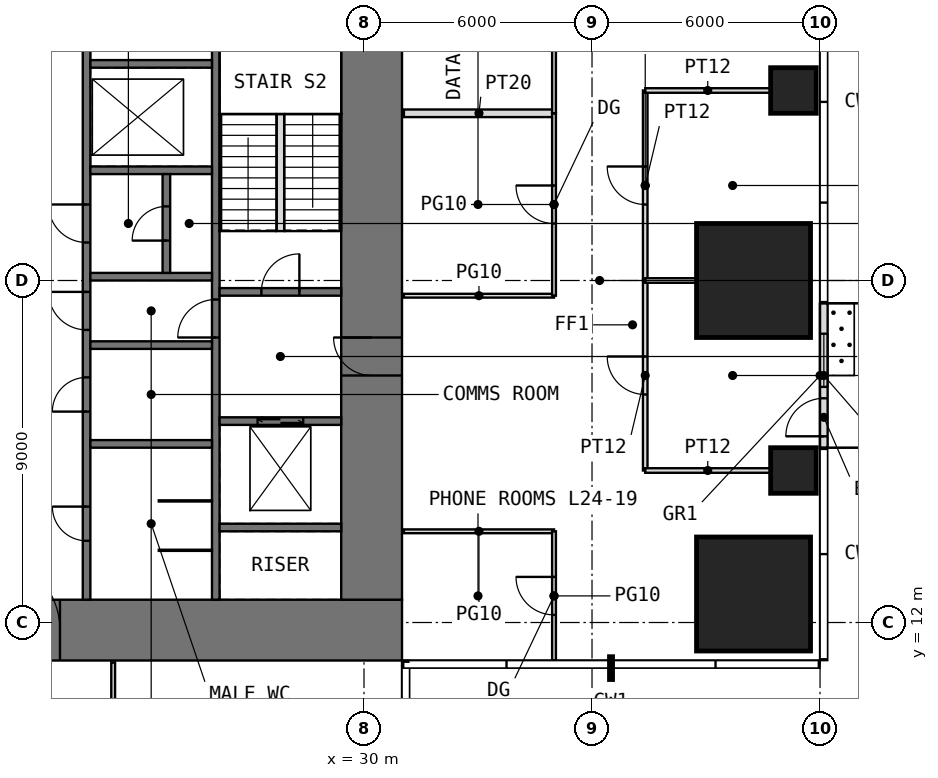
"""IFC4 building model, lengths in metres.
Left out: names, types, materials, properties, quantities, classifications, styles, units other than length and angle.
Written with IfcOpenShell. Run it as: python <this file> out.ifc"""

import sys

from ifc_helpers import new_model, si_unit, direction, frame, frame_2d, origin, origin_2d, place, context, subcontext, project, spatial, rectangle, extrude, element, fill, save


model = new_model("IFC4")
c1 = context("Model", 3, precision=1e-05, world=origin(), true_north=direction((0.0, 1.0)))
c2 = subcontext(c1, "Body", "Model", "MODEL_VIEW")
j1 = project(units=[si_unit("LENGTHUNIT", "METRE"), si_unit("PLANEANGLEUNIT", "RADIAN")], contexts=[c1])
p1 = place(None, origin())
s1 = spatial("IfcSite", under=j1, at=p1, CompositionType="ELEMENT")
p2 = place(p1, origin())
s2 = spatial("IfcBuilding", under=s1, at=p2, CompositionType="ELEMENT")
p3 = place(p2, frame((0.0, 0.0, 104.5)))
s3 = spatial("IfcBuildingStorey", under=s2, at=p3, CompositionType="ELEMENT", Elevation=104.5)
p4 = place(p3, frame((40.25, 12.75, 0.0), z_axis=(0.0, 0.0, 1.0), x_axis=(1.0, 0.0, 0.0)))
e1 = element("IfcColumn", 1, at=p4, inside=s3, PredefinedType="COLUMN", context=c2, shape_type="SweptSolid", body=[
    extrude(rectangle(XDim=3.0, YDim=3.0, at=origin_2d()), origin(), (0.0, 0.0, 1.0), 4.0),
])
p5 = place(p3, frame((41.3, 16.0, 0.0), z_axis=(0.0, 0.0, 1.0), x_axis=(1.0, 0.0, 0.0)))
e2 = element("IfcColumn", 2, at=p5, inside=s3, PredefinedType="COLUMN", context=c2, shape_type="SweptSolid", body=[
    extrude(rectangle(XDim=1.2, YDim=1.2, at=origin_2d()), origin(), (0.0, 0.0, 1.0), 4.0),
])
p6 = place(p3, frame((40.25, 21.0, 0.0), z_axis=(0.0, 0.0, 1.0), x_axis=(1.0, 0.0, 0.0)))
e3 = element("IfcColumn", 3, at=p6, inside=s3, PredefinedType="COLUMN", context=c2, shape_type="SweptSolid", body=[
    extrude(rectangle(XDim=3.0, YDim=3.0, at=origin_2d()), origin(), (0.0, 0.0, 1.0), 4.0),
])
p7 = place(p3, frame((41.3, 26.0, 0.0), z_axis=(0.0, 0.0, 1.0), x_axis=(1.0, 0.0, 0.0)))
e4 = element("IfcColumn", 4, at=p7, inside=s3, PredefinedType="COLUMN", context=c2, shape_type="SweptSolid", body=[
    extrude(rectangle(XDim=1.2, YDim=1.2, at=origin_2d()), origin(), (0.0, 0.0, 1.0), 4.0),
])
p8 = place(p3, frame((42.1, 16.6, 0.0), z_axis=(0.0, 0.0, 1.0), x_axis=(0.0, 1.0, 0.0)))
e5 = element("IfcWall", 5, at=p8, inside=s3, PredefinedType="USERDEFINED", context=c2, shape_type="SweptSolid", body=[
    extrude(rectangle(XDim=3.8, YDim=0.2, at=frame_2d((1.9, 0.0))), origin(), (0.0, 0.0, 1.0), 3.75),
])
p9 = place(p8, frame((0.3, 0.0, 0.0)))
e6 = element("IfcOpeningElement", 6, at=p9, cuts=e5, PredefinedType="OPENING", context=c2, shape_type="SweptSolid", body=[
    extrude(rectangle(XDim=1.0, YDim=2.4, at=frame_2d((0.5, 1.2))), frame((0.0, 0.11, 0.0), z_axis=(0.0, -1.0, 0.0), x_axis=(1.0, 0.0, 0.0)), (0.0, 0.0, 1.0), 0.22),
])
p10 = place(p8, frame((1.6, 0.0, 0.3)))
e7 = element("IfcOpeningElement", 7, at=p10, cuts=e5, PredefinedType="OPENING", context=c2, shape_type="SweptSolid", body=[
    extrude(rectangle(XDim=1.4, YDim=2.7, at=frame_2d((0.7, 1.35))), frame((0.0, 0.11, 0.0), z_axis=(0.0, -1.0, 0.0), x_axis=(1.0, 0.0, 0.0)), (0.0, 0.0, 1.0), 0.22),
])
p11 = place(p3, frame((11.0, 11.8, -0.05), z_axis=(0.0, 0.0, 1.0), x_axis=(1.0, 0.0, 0.0)))
e8 = element("IfcWall", 8, at=p11, inside=s3, PredefinedType="SHEAR", context=c2, shape_type="SweptSolid", body=[
    extrude(rectangle(XDim=20.0, YDim=1.6, at=frame_2d((10.0, 0.0))), origin(), (0.0, 0.0, 1.0), 4.0),
])
p12 = place(p11, frame((9.0, 0.0, 0.05)))
e9 = element("IfcOpeningElement", 9, at=p12, cuts=e8, PredefinedType="OPENING", context=c2, shape_type="SweptSolid", body=[
    extrude(rectangle(XDim=2.0, YDim=2.2, at=frame_2d((1.0, 1.1))), frame((0.0, 0.81, 0.0), z_axis=(0.0, -1.0, 0.0), x_axis=(1.0, 0.0, 0.0)), (0.0, 0.0, 1.0), 1.62),
])
p13 = place(p3, frame((30.2, 12.6, -0.05), z_axis=(0.0, 0.0, 1.0), x_axis=(0.0, 1.0, 0.0)))
e10 = element("IfcWall", 10, at=p13, inside=s3, PredefinedType="SHEAR", context=c2, shape_type="SweptSolid", body=[
    extrude(rectangle(XDim=16.8, YDim=1.6, at=frame_2d((8.4, 0.0))), origin(), (0.0, 0.0, 1.0), 4.0),
])
p14 = place(p13, frame((5.9, 0.0, 0.05)))
e11 = element("IfcOpeningElement", 11, at=p14, cuts=e10, PredefinedType="OPENING", context=c2, shape_type="SweptSolid", body=[
    extrude(rectangle(XDim=1.0, YDim=2.2, at=frame_2d((0.5, 1.1))), frame((0.0, 0.81, 0.0), z_axis=(0.0, -1.0, 0.0), x_axis=(1.0, 0.0, 0.0)), (0.0, 0.0, 1.0), 1.62),
])
p15 = place(p3, frame((22.7, 12.6, -0.05), z_axis=(0.0, 0.0, 1.0), x_axis=(0.0, 1.0, 0.0)))
e12 = element("IfcWall", 12, at=p15, inside=s3, PredefinedType="SHEAR", context=c2, shape_type="SweptSolid", body=[
    extrude(rectangle(XDim=16.8, YDim=0.2, at=frame_2d((8.4, 0.0))), origin(), (0.0, 0.0, 1.0), 4.0),
])
p16 = place(p15, frame((7.1, 0.0, 0.05)))
e13 = element("IfcOpeningElement", 13, at=p16, cuts=e12, PredefinedType="OPENING", context=c2, shape_type="SweptSolid", body=[
    extrude(rectangle(XDim=1.0, YDim=2.2, at=frame_2d((0.5, 1.1))), frame((0.0, 0.11, 0.0), z_axis=(0.0, -1.0, 0.0), x_axis=(1.0, 0.0, 0.0)), (0.0, 0.0, 1.0), 0.22),
])
p17 = place(p15, frame((1.55, 0.0, 0.05)))
e14 = element("IfcOpeningElement", 14, at=p17, cuts=e12, PredefinedType="OPENING", context=c2, shape_type="SweptSolid", body=[
    extrude(rectangle(XDim=0.9, YDim=2.2, at=frame_2d((0.45, 1.1))), frame((0.0, 0.11, 0.0), z_axis=(0.0, -1.0, 0.0), x_axis=(1.0, 0.0, 0.0)), (0.0, 0.0, 1.0), 0.22),
])
p18 = place(p15, frame((4.95, 0.0, 0.05)))
e15 = element("IfcOpeningElement", 15, at=p18, cuts=e12, PredefinedType="OPENING", context=c2, shape_type="SweptSolid", body=[
    extrude(rectangle(XDim=0.9, YDim=2.2, at=frame_2d((0.45, 1.1))), frame((0.0, 0.11, 0.0), z_axis=(0.0, -1.0, 0.0), x_axis=(1.0, 0.0, 0.0)), (0.0, 0.0, 1.0), 0.22),
])
p19 = place(p15, frame((9.4, 0.0, 0.05)))
e16 = element("IfcOpeningElement", 16, at=p19, cuts=e12, PredefinedType="OPENING", context=c2, shape_type="SweptSolid", body=[
    extrude(rectangle(XDim=1.0, YDim=2.2, at=frame_2d((0.5, 1.1))), frame((0.0, 0.11, 0.0), z_axis=(0.0, -1.0, 0.0), x_axis=(1.0, 0.0, 0.0)), (0.0, 0.0, 1.0), 0.22),
])
p20 = place(p3, frame((26.1, 12.6, -0.05), z_axis=(0.0, 0.0, 1.0), x_axis=(0.0, 1.0, 0.0)))
e17 = element("IfcWall", 17, at=p20, inside=s3, PredefinedType="SHEAR", context=c2, shape_type="SweptSolid", body=[
    extrude(rectangle(XDim=16.8, YDim=0.2, at=frame_2d((8.4, 0.0))), origin(), (0.0, 0.0, 1.0), 4.0),
])
p21 = place(p20, frame((6.9, 0.0, 0.05)))
e18 = element("IfcOpeningElement", 18, at=p21, cuts=e17, PredefinedType="OPENING", context=c2, shape_type="SweptSolid", body=[
    extrude(rectangle(XDim=1.0, YDim=2.2, at=frame_2d((0.5, 1.1))), frame((0.0, 0.11, 0.0), z_axis=(0.0, -1.0, 0.0), x_axis=(1.0, 0.0, 0.0)), (0.0, 0.0, 1.0), 0.22),
])
for number, where, z_axis, x_axis in (
    (19, (22.8, 16.7, -0.05), (0.0, 0.0, 1.0), (1.0, 0.0, 0.0)),
    (20, (22.8, 19.3, -0.05), (0.0, 0.0, 1.0), (1.0, 0.0, 0.0)),
    (21, (22.8, 21.1, -0.05), (0.0, 0.0, 1.0), (1.0, 0.0, 0.0)),
    (22, (22.8, 23.9, -0.05), (0.0, 0.0, 1.0), (1.0, 0.0, 0.0)),
    (23, (22.8, 26.7, -0.05), (0.0, 0.0, 1.0), (1.0, 0.0, 0.0)),
    (24, (26.2, 14.5, -0.05), (0.0, 0.0, 1.0), (1.0, 0.0, 0.0)),
):
    element("IfcWall", number, at=place(p3, frame(where, z_axis=z_axis, x_axis=x_axis)), inside=s3, PredefinedType="SHEAR", context=c2, shape_type="SweptSolid", body=[
        extrude(rectangle(XDim=3.2, YDim=0.2, at=frame_2d((1.6, 0.0))), origin(), (0.0, 0.0, 1.0), 4.0),
    ])
p22 = place(p3, frame((26.2, 17.3, -0.05), z_axis=(0.0, 0.0, 1.0), x_axis=(1.0, 0.0, 0.0)))
e25 = element("IfcWall", 25, at=p22, inside=s3, PredefinedType="SHEAR", context=c2, shape_type="SweptSolid", body=[
    extrude(rectangle(XDim=3.2, YDim=0.2, at=frame_2d((1.6, 0.0))), origin(), (0.0, 0.0, 1.0), 4.0),
])
p23 = place(p22, frame((1.0, 0.0, 0.05)))
e26 = element("IfcOpeningElement", 26, at=p23, cuts=e25, PredefinedType="OPENING", context=c2, shape_type="SweptSolid", body=[
    extrude(rectangle(XDim=1.2, YDim=2.2, at=frame_2d((0.6, 1.1))), frame((0.0, 0.11, 0.0), z_axis=(0.0, -1.0, 0.0), x_axis=(1.0, 0.0, 0.0)), (0.0, 0.0, 1.0), 0.22),
])
p24 = place(p3, frame((26.2, 20.7, -0.05), z_axis=(0.0, 0.0, 1.0), x_axis=(1.0, 0.0, 0.0)))
e27 = element("IfcWall", 27, at=p24, inside=s3, PredefinedType="SHEAR", context=c2, shape_type="SweptSolid", body=[
    extrude(rectangle(XDim=3.2, YDim=0.2, at=frame_2d((1.6, 0.0))), origin(), (0.0, 0.0, 1.0), 4.0),
])
p25 = place(p24, frame((1.1, 0.0, 0.05)))
e28 = element("IfcOpeningElement", 28, at=p25, cuts=e27, PredefinedType="OPENING", context=c2, shape_type="SweptSolid", body=[
    extrude(rectangle(XDim=1.0, YDim=2.2, at=frame_2d((0.5, 1.1))), frame((0.0, 0.11, 0.0), z_axis=(0.0, -1.0, 0.0), x_axis=(1.0, 0.0, 0.0)), (0.0, 0.0, 1.0), 0.22),
])
for number, where, z_axis, x_axis in (
    (29, (24.6, 13.9, 0.0), (0.0, 0.0, 1.0), (1.0, 0.0, 0.0)),
    (30, (24.6, 15.2, 0.0), (0.0, 0.0, 1.0), (1.0, 0.0, 0.0)),
):
    element("IfcWall", number, at=place(p3, frame(where, z_axis=z_axis, x_axis=x_axis)), inside=s3, PredefinedType="PARTITIONING", context=c2, shape_type="SweptSolid", body=[
        extrude(rectangle(XDim=1.4, YDim=0.03, at=frame_2d((0.7, 0.0))), origin(), (0.0, 0.0, 1.0), 3.75),
    ])
p26 = place(p3, frame((24.8, 21.2, -0.05), z_axis=(0.0, 0.0, 1.0), x_axis=(0.0, 1.0, 0.0)))
e31 = element("IfcWall", 31, at=p26, inside=s3, PredefinedType="SHEAR", context=c2, shape_type="SweptSolid", body=[
    extrude(rectangle(XDim=2.6, YDim=0.2, at=frame_2d((1.3, 0.0))), origin(), (0.0, 0.0, 1.0), 4.0),
])
p27 = place(p26, frame((0.85, 0.0, 0.05)))
e32 = element("IfcOpeningElement", 32, at=p27, cuts=e31, PredefinedType="OPENING", context=c2, shape_type="SweptSolid", body=[
    extrude(rectangle(XDim=0.9, YDim=2.2, at=frame_2d((0.45, 1.1))), frame((0.0, 0.11, 0.0), z_axis=(0.0, -1.0, 0.0), x_axis=(1.0, 0.0, 0.0)), (0.0, 0.0, 1.0), 0.22),
])
for number, where, z_axis, x_axis in (
    (33, (23.4, 7.0, 0.0), (0.0, 0.0, 1.0), (0.0, 1.0, 0.0)),
    (34, (31.05, 14.4, 0.0), (0.0, 0.0, 1.0), (1.0, 0.0, 0.0)),
    (35, (31.05, 20.6, 0.0), (0.0, 0.0, 1.0), (1.0, 0.0, 0.0)),
):
    element("IfcWall", number, at=place(p3, frame(where, z_axis=z_axis, x_axis=x_axis)), inside=s3, PredefinedType="PARTITIONING", context=c2, shape_type="SweptSolid", body=[
        extrude(rectangle(XDim=3.95, YDim=0.1, at=frame_2d((1.975, 0.0))), origin(), (0.0, 0.0, 1.0), 3.75),
    ])
p28 = place(p3, frame((31.05, 25.4, 0.0), z_axis=(0.0, 0.0, 1.0), x_axis=(1.0, 0.0, 0.0)))
e36 = element("IfcWall", 36, at=p28, inside=s3, PredefinedType="PARTITIONING", context=c2, shape_type="SweptSolid", body=[
    extrude(rectangle(XDim=3.95, YDim=0.2, at=frame_2d((1.975, 0.0))), origin(), (0.0, 0.0, 1.0), 3.75),
])
p29 = place(p3, frame((35.0, 11.0, 0.0), z_axis=(0.0, 0.0, 1.0), x_axis=(0.0, 1.0, 0.0)))
e37 = element("IfcWall", 37, at=p29, inside=s3, PredefinedType="PARTITIONING", context=c2, shape_type="SweptSolid", body=[
    extrude(rectangle(XDim=3.4, YDim=0.1, at=frame_2d((1.7, 0.0))), origin(), (0.0, 0.0, 1.0), 3.75),
])
p30 = place(p29, frame((1.2, 0.0, 0.0)))
e38 = element("IfcOpeningElement", 38, at=p30, cuts=e37, PredefinedType="OPENING", context=c2, shape_type="SweptSolid", body=[
    extrude(rectangle(XDim=1.0, YDim=2.4, at=frame_2d((0.5, 1.2))), frame((0.0, 0.06, 0.0), z_axis=(0.0, -1.0, 0.0), x_axis=(1.0, 0.0, 0.0)), (0.0, 0.0, 1.0), 0.12),
])
p31 = place(p3, frame((35.0, 20.6, 0.0), z_axis=(0.0, 0.0, 1.0), x_axis=(0.0, 1.0, 0.0)))
e39 = element("IfcWall", 39, at=p31, inside=s3, PredefinedType="PARTITIONING", context=c2, shape_type="SweptSolid", body=[
    extrude(rectangle(XDim=4.8, YDim=0.1, at=frame_2d((2.4, 0.0))), origin(), (0.0, 0.0, 1.0), 3.75),
])
p32 = place(p31, frame((1.9, 0.0, 0.0)))
e40 = element("IfcOpeningElement", 40, at=p32, cuts=e39, PredefinedType="OPENING", context=c2, shape_type="SweptSolid", body=[
    extrude(rectangle(XDim=1.0, YDim=2.4, at=frame_2d((0.5, 1.2))), frame((0.0, 0.06, 0.0), z_axis=(0.0, -1.0, 0.0), x_axis=(1.0, 0.0, 0.0)), (0.0, 0.0, 1.0), 0.12),
])
p33 = place(p3, frame((35.0, 25.4, 0.0), z_axis=(0.0, 0.0, 1.0), x_axis=(0.0, 1.0, 0.0)))
e41 = element("IfcWall", 41, at=p33, inside=s3, PredefinedType="PARTITIONING", context=c2, shape_type="SweptSolid", body=[
    extrude(rectangle(XDim=5.6, YDim=0.1, at=frame_2d((2.8, 0.0))), origin(), (0.0, 0.0, 1.0), 3.75),
])
p34 = place(p33, frame((2.3, 0.0, 0.0)))
e42 = element("IfcOpeningElement", 42, at=p34, cuts=e41, PredefinedType="OPENING", context=c2, shape_type="SweptSolid", body=[
    extrude(rectangle(XDim=1.0, YDim=2.4, at=frame_2d((0.5, 1.2))), frame((0.0, 0.06, 0.0), z_axis=(0.0, -1.0, 0.0), x_axis=(1.0, 0.0, 0.0)), (0.0, 0.0, 1.0), 0.12),
])
p35 = place(p3, frame((37.4, 16.0, 0.0), z_axis=(0.0, 0.0, 1.0), x_axis=(0.0, 1.0, 0.0)))
e43 = element("IfcWall", 43, at=p35, inside=s3, PredefinedType="PARTITIONING", context=c2, shape_type="SweptSolid", body=[
    extrude(rectangle(XDim=5.0, YDim=0.12, at=frame_2d((2.5, 0.0))), origin(), (0.0, 0.0, 1.0), 3.75),
])
p36 = place(p35, frame((2.0, 0.0, 0.0)))
e44 = element("IfcOpeningElement", 44, at=p36, cuts=e43, PredefinedType="OPENING", context=c2, shape_type="SweptSolid", body=[
    extrude(rectangle(XDim=1.0, YDim=2.2, at=frame_2d((0.5, 1.1))), frame((0.0, 0.07, 0.0), z_axis=(0.0, -1.0, 0.0), x_axis=(1.0, 0.0, 0.0)), (0.0, 0.0, 1.0), 0.14),
])
p37 = place(p3, frame((37.4, 16.0, 0.0), z_axis=(0.0, 0.0, 1.0), x_axis=(1.0, 0.0, 0.0)))
e45 = element("IfcWall", 45, at=p37, inside=s3, PredefinedType="PARTITIONING", context=c2, shape_type="SweptSolid", body=[
    extrude(rectangle(XDim=3.29, YDim=0.12, at=frame_2d((1.645, 0.0))), origin(), (0.0, 0.0, 1.0), 3.75),
])
p38 = place(p3, frame((37.4, 21.0, 0.0), z_axis=(0.0, 0.0, 1.0), x_axis=(0.0, 1.0, 0.0)))
e46 = element("IfcWall", 46, at=p38, inside=s3, PredefinedType="PARTITIONING", context=c2, shape_type="SweptSolid", body=[
    extrude(rectangle(XDim=5.0, YDim=0.12, at=frame_2d((2.5, 0.0))), origin(), (0.0, 0.0, 1.0), 3.75),
])
p39 = place(p38, frame((2.0, 0.0, 0.0)))
e47 = element("IfcOpeningElement", 47, at=p39, cuts=e46, PredefinedType="OPENING", context=c2, shape_type="SweptSolid", body=[
    extrude(rectangle(XDim=1.0, YDim=2.2, at=frame_2d((0.5, 1.1))), frame((0.0, 0.07, 0.0), z_axis=(0.0, -1.0, 0.0), x_axis=(1.0, 0.0, 0.0)), (0.0, 0.0, 1.0), 0.14),
])
p40 = place(p3, frame((37.4, 21.0, 0.0), z_axis=(0.0, 0.0, 1.0), x_axis=(1.0, 0.0, 0.0)))
e48 = element("IfcWall", 48, at=p40, inside=s3, PredefinedType="PARTITIONING", context=c2, shape_type="SweptSolid", body=[
    extrude(rectangle(XDim=1.34, YDim=0.12, at=frame_2d((0.67, 0.0))), origin(), (0.0, 0.0, 1.0), 3.75),
])
p41 = place(p3, frame((37.4, 26.0, 0.0), z_axis=(0.0, 0.0, 1.0), x_axis=(1.0, 0.0, 0.0)))
e49 = element("IfcWall", 49, at=p41, inside=s3, PredefinedType="PARTITIONING", context=c2, shape_type="SweptSolid", body=[
    extrude(rectangle(XDim=3.29, YDim=0.12, at=frame_2d((1.645, 0.0))), origin(), (0.0, 0.0, 1.0), 3.75),
])
p42 = place(p3, frame((27.8, 22.3, 0.0), z_axis=(0.0, 0.0, 1.0), x_axis=(0.0, 1.0, 0.0)))
e50 = element("IfcWall", 50, at=p42, inside=s3, PredefinedType="PARTITIONING", context=c2, shape_type="SweptSolid", body=[
    extrude(rectangle(XDim=3.08, YDim=0.2, at=frame_2d((1.54, 0.0))), origin(), (0.0, 0.0, 1.0), 4.0),
])
p43 = place(p9, origin())
e51 = element("IfcDoor", 51, at=p43, inside=s3, OperationType="SINGLE_SWING_LEFT", PredefinedType="DOOR", context=c2, shape_type="SweptSolid", body=[
    extrude(rectangle(XDim=1.0, YDim=2.4, at=frame_2d((0.5, 1.2))), frame((0.0, 0.025, 0.0), z_axis=(0.0, -1.0, 0.0), x_axis=(1.0, 0.0, 0.0)), (0.0, 0.0, 1.0), 0.05),
])
fill(e6, e51)
p44 = place(p10, origin())
e52 = element("IfcWindow", 52, at=p44, inside=s3, PartitioningType="SINGLE_PANEL", PredefinedType="WINDOW", context=c2, shape_type="SweptSolid", body=[
    extrude(rectangle(XDim=1.4, YDim=2.7, at=frame_2d((0.7, 1.35))), frame((0.0, 0.03, 0.0), z_axis=(0.0, -1.0, 0.0), x_axis=(1.0, 0.0, 0.0)), (0.0, 0.0, 1.0), 0.06),
])
fill(e7, e52)
p45 = place(p12, origin())
e53 = element("IfcDoor", 53, at=p45, inside=s3, OperationType="DOUBLE_DOOR_SINGLE_SWING", PredefinedType="DOOR", context=c2, shape_type="SweptSolid", body=[
    extrude(rectangle(XDim=2.0, YDim=2.2, at=frame_2d((1.0, 1.1))), frame((0.0, 0.025, 0.0), z_axis=(0.0, -1.0, 0.0), x_axis=(1.0, 0.0, 0.0)), (0.0, 0.0, 1.0), 0.05),
])
fill(e9, e53)
p46 = place(p14, origin())
e54 = element("IfcDoor", 54, at=p46, inside=s3, OperationType="SINGLE_SWING_RIGHT", PredefinedType="DOOR", context=c2, shape_type="SweptSolid", body=[
    extrude(rectangle(XDim=1.0, YDim=2.2, at=frame_2d((0.5, 1.1))), frame((0.0, 0.025, 0.0), z_axis=(0.0, -1.0, 0.0), x_axis=(1.0, 0.0, 0.0)), (0.0, 0.0, 1.0), 0.05),
])
fill(e11, e54)
p47 = place(p25, origin())
e55 = element("IfcDoor", 55, at=p47, inside=s3, OperationType="SINGLE_SWING_RIGHT", PredefinedType="DOOR", context=c2, shape_type="SweptSolid", body=[
    extrude(rectangle(XDim=1.0, YDim=2.2, at=frame_2d((0.5, 1.1))), frame((0.0, 0.025, 0.0), z_axis=(0.0, -1.0, 0.0), x_axis=(1.0, 0.0, 0.0)), (0.0, 0.0, 1.0), 0.05),
])
fill(e28, e55)
p48 = place(p21, origin())
e56 = element("IfcDoor", 56, at=p48, inside=s3, OperationType="SINGLE_SWING_LEFT", PredefinedType="DOOR", context=c2, shape_type="SweptSolid", body=[
    extrude(rectangle(XDim=1.0, YDim=2.2, at=frame_2d((0.5, 1.1))), frame((0.0, 0.025, 0.0), z_axis=(0.0, -1.0, 0.0), x_axis=(1.0, 0.0, 0.0)), (0.0, 0.0, 1.0), 0.05),
])
fill(e18, e56)
p49 = place(p16, origin())
e57 = element("IfcDoor", 57, at=p49, inside=s3, OperationType="SINGLE_SWING_RIGHT", PredefinedType="DOOR", context=c2, shape_type="SweptSolid", body=[
    extrude(rectangle(XDim=1.0, YDim=2.2, at=frame_2d((0.5, 1.1))), frame((0.0, 0.025, 0.0), z_axis=(0.0, -1.0, 0.0), x_axis=(1.0, 0.0, 0.0)), (0.0, 0.0, 1.0), 0.05),
])
fill(e13, e57)
p50 = place(p17, origin())
e58 = element("IfcDoor", 58, at=p50, inside=s3, OperationType="SINGLE_SWING_RIGHT", PredefinedType="DOOR", context=c2, shape_type="SweptSolid", body=[
    extrude(rectangle(XDim=0.9, YDim=2.2, at=frame_2d((0.45, 1.1))), frame((0.0, 0.025, 0.0), z_axis=(0.0, -1.0, 0.0), x_axis=(1.0, 0.0, 0.0)), (0.0, 0.0, 1.0), 0.05),
])
fill(e14, e58)
p51 = place(p18, origin())
e59 = element("IfcDoor", 59, at=p51, inside=s3, OperationType="SINGLE_SWING_LEFT", PredefinedType="DOOR", context=c2, shape_type="SweptSolid", body=[
    extrude(rectangle(XDim=0.9, YDim=2.2, at=frame_2d((0.45, 1.1))), frame((0.0, 0.025, 0.0), z_axis=(0.0, -1.0, 0.0), x_axis=(1.0, 0.0, 0.0)), (0.0, 0.0, 1.0), 0.05),
])
fill(e15, e59)
p52 = place(p19, origin())
e60 = element("IfcDoor", 60, at=p52, inside=s3, OperationType="SINGLE_SWING_RIGHT", PredefinedType="DOOR", context=c2, shape_type="SweptSolid", body=[
    extrude(rectangle(XDim=1.0, YDim=2.2, at=frame_2d((0.5, 1.1))), frame((0.0, 0.025, 0.0), z_axis=(0.0, -1.0, 0.0), x_axis=(1.0, 0.0, 0.0)), (0.0, 0.0, 1.0), 0.05),
])
fill(e16, e60)
p53 = place(p27, origin())
e61 = element("IfcDoor", 61, at=p53, inside=s3, OperationType="SINGLE_SWING_LEFT", PredefinedType="DOOR", context=c2, shape_type="SweptSolid", body=[
    extrude(rectangle(XDim=0.9, YDim=2.2, at=frame_2d((0.45, 1.1))), frame((0.0, 0.025, 0.0), z_axis=(0.0, -1.0, 0.0), x_axis=(1.0, 0.0, 0.0)), (0.0, 0.0, 1.0), 0.05),
])
fill(e32, e61)
p54 = place(p30, origin())
e62 = element("IfcDoor", 62, at=p54, inside=s3, OperationType="SINGLE_SWING_RIGHT", PredefinedType="DOOR", context=c2, shape_type="SweptSolid", body=[
    extrude(rectangle(XDim=1.0, YDim=2.4, at=frame_2d((0.5, 1.2))), frame((0.0, 0.025, 0.0), z_axis=(0.0, -1.0, 0.0), x_axis=(1.0, 0.0, 0.0)), (0.0, 0.0, 1.0), 0.05),
])
fill(e38, e62)
p55 = place(p32, origin())
e63 = element("IfcDoor", 63, at=p55, inside=s3, OperationType="SINGLE_SWING_RIGHT", PredefinedType="DOOR", context=c2, shape_type="SweptSolid", body=[
    extrude(rectangle(XDim=1.0, YDim=2.4, at=frame_2d((0.5, 1.2))), frame((0.0, 0.025, 0.0), z_axis=(0.0, -1.0, 0.0), x_axis=(1.0, 0.0, 0.0)), (0.0, 0.0, 1.0), 0.05),
])
fill(e40, e63)
p56 = place(p36, origin())
e64 = element("IfcDoor", 64, at=p56, inside=s3, OperationType="SINGLE_SWING_RIGHT", PredefinedType="DOOR", context=c2, shape_type="SweptSolid", body=[
    extrude(rectangle(XDim=1.0, YDim=2.2, at=frame_2d((0.5, 1.1))), frame((0.0, 0.025, 0.0), z_axis=(0.0, -1.0, 0.0), x_axis=(1.0, 0.0, 0.0)), (0.0, 0.0, 1.0), 0.05),
])
fill(e44, e64)
p57 = place(p39, origin())
e65 = element("IfcDoor", 65, at=p57, inside=s3, OperationType="SINGLE_SWING_RIGHT", PredefinedType="DOOR", context=c2, shape_type="SweptSolid", body=[
    extrude(rectangle(XDim=1.0, YDim=2.2, at=frame_2d((0.5, 1.1))), frame((0.0, 0.025, 0.0), z_axis=(0.0, -1.0, 0.0), x_axis=(1.0, 0.0, 0.0)), (0.0, 0.0, 1.0), 0.05),
])
fill(e47, e65)
p58 = place(p23, origin())
e66 = element("IfcDoor", 66, at=p58, inside=s3, OperationType="DOUBLE_DOOR_SLIDING", PredefinedType="DOOR", context=c2, shape_type="SweptSolid", body=[
    extrude(rectangle(XDim=1.2, YDim=2.2, at=frame_2d((0.6, 1.1))), frame((0.0, 0.025, 0.0), z_axis=(0.0, -1.0, 0.0), x_axis=(1.0, 0.0, 0.0)), (0.0, 0.0, 1.0), 0.05),
])
fill(e26, e66)
save(model, sys.argv[1])
